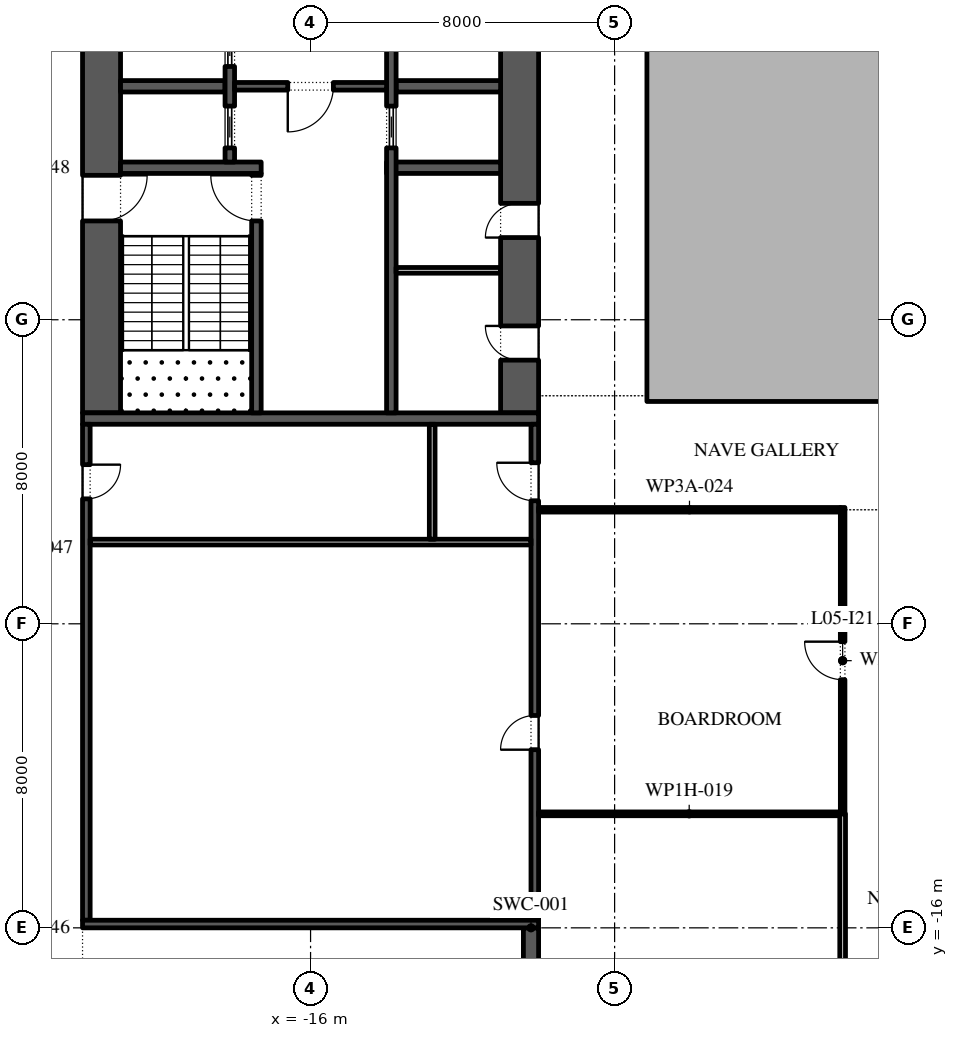
"""IFC4 building model, lengths in metres.
Left out: names, types, materials, properties, quantities, classifications, styles, units other than length and angle.
Written with IfcOpenShell. Run it as: python <this file> out.ifc"""

import sys

from ifc_helpers import new_model, si_unit, direction, frame, frame_2d, origin, place, context, subcontext, project, spatial, polyline, rectangle, outline, extrude, element, fill, save


model = new_model("IFC4")
c1 = context("Model", 3, precision=1e-05, world=origin(), true_north=direction((0.0, 1.0)))
c2 = subcontext(c1, "Body", "Model", "MODEL_VIEW")
j1 = project(units=[si_unit("LENGTHUNIT", "METRE"), si_unit("PLANEANGLEUNIT", "RADIAN")], contexts=[c1])
p1 = place(None, origin())
s1 = spatial("IfcSite", under=j1, at=p1, CompositionType="ELEMENT")
p2 = place(p1, origin())
s2 = spatial("IfcBuilding", under=s1, at=p2, CompositionType="ELEMENT")
p3 = place(p2, frame((0.0, 0.0, 28.8)))
s3 = spatial("IfcBuildingStorey", under=s2, at=p3, CompositionType="ELEMENT", Elevation=28.8)
p4 = place(p3, frame((-10.2, -31.0, 0.0), z_axis=(0.0, 0.0, 1.0), x_axis=(0.0, 1.0, 0.0)))
e1 = element("IfcWall", 1, at=p4, inside=s3, PredefinedType="SHEAR", context=c2, shape_type="SweptSolid", body=[
    extrude(rectangle(XDim=15.0, YDim=0.4, at=frame_2d((7.5, 0.0))), origin(), (0.0, 0.0, 1.0), 4.35),
])
p5 = place(p3, origin())
e2 = element("IfcWall", 2, at=p5, inside=s3, PredefinedType="STANDARD", context=c2, shape_type="SweptSolid", body=[
    extrude(outline(polyline([(-7.15, -2.15), (7.15, -2.15), (7.15, 16.15), (-7.15, 16.15), (-7.15, -2.15)]), holes=[polyline([(-7.0, -2.0), (-7.0, 16.0), (7.0, 16.0), (7.0, -2.0), (-7.0, -2.0)])]), origin(), (0.0, 0.0, 1.0), 4.35),
])
p6 = place(p3, frame((-21.5, -2.45, 0.0), z_axis=(0.0, 0.0, 1.0), x_axis=(0.0, 1.0, 0.0)))
e3 = element("IfcWall", 3, at=p6, inside=s3, PredefinedType="SHEAR", context=c2, shape_type="SweptSolid", body=[
    extrude(rectangle(XDim=27.9, YDim=1.0, at=frame_2d((13.95, 0.0))), origin(), (0.0, 0.0, 1.0), 4.35),
])
p7 = place(p6, frame((5.05, 0.0, 0.0)))
e4 = element("IfcOpeningElement", 4, at=p7, cuts=e3, PredefinedType="OPENING", context=c2, shape_type="SweptSolid", body=[
    extrude(rectangle(XDim=1.2, YDim=2.1, at=frame_2d((0.6, 1.05))), frame((0.0, 0.51, 0.0), z_axis=(0.0, -1.0, 0.0), x_axis=(1.0, 0.0, 0.0)), (0.0, 0.0, 1.0), 1.02),
])
p8 = place(p6, frame((21.65, 0.0, 0.0)))
e5 = element("IfcOpeningElement", 5, at=p8, cuts=e3, PredefinedType="OPENING", context=c2, shape_type="SweptSolid", body=[
    extrude(rectangle(XDim=1.2, YDim=2.1, at=frame_2d((0.6, 1.05))), frame((0.0, 0.51, 0.0), z_axis=(0.0, -1.0, 0.0), x_axis=(1.0, 0.0, 0.0)), (0.0, 0.0, 1.0), 1.02),
])
p9 = place(p3, frame((-10.5, -2.45, 0.0), z_axis=(0.0, 0.0, 1.0), x_axis=(0.0, 1.0, 0.0)))
e6 = element("IfcWall", 6, at=p9, inside=s3, PredefinedType="SHEAR", context=c2, shape_type="SweptSolid", body=[
    extrude(rectangle(XDim=27.9, YDim=1.0, at=frame_2d((13.95, 0.0))), origin(), (0.0, 0.0, 1.0), 4.35),
])
p10 = place(p9, frame((23.65, 0.0, 0.0)))
e7 = element("IfcOpeningElement", 7, at=p10, cuts=e6, PredefinedType="OPENING", context=c2, shape_type="SweptSolid", body=[
    extrude(rectangle(XDim=2.4, YDim=2.1, at=frame_2d((1.2, 1.05))), frame((0.0, 0.51, 0.0), z_axis=(0.0, -1.0, 0.0), x_axis=(1.0, 0.0, 0.0)), (0.0, 0.0, 1.0), 1.02),
])
p11 = place(p9, frame((1.387, 0.0, 0.0)))
e8 = element("IfcOpeningElement", 8, at=p11, cuts=e6, PredefinedType="OPENING", context=c2, shape_type="SweptSolid", body=[
    extrude(rectangle(XDim=0.9, YDim=2.1, at=frame_2d((0.45, 1.05))), frame((0.0, 0.51, 0.0), z_axis=(0.0, -1.0, 0.0), x_axis=(1.0, 0.0, 0.0)), (0.0, 0.0, 1.0), 1.02),
])
p12 = place(p9, frame((4.613, 0.0, 0.0)))
e9 = element("IfcOpeningElement", 9, at=p12, cuts=e6, PredefinedType="OPENING", context=c2, shape_type="SweptSolid", body=[
    extrude(rectangle(XDim=0.9, YDim=2.1, at=frame_2d((0.45, 1.05))), frame((0.0, 0.51, 0.0), z_axis=(0.0, -1.0, 0.0), x_axis=(1.0, 0.0, 0.0)), (0.0, 0.0, 1.0), 1.02),
])
p13 = place(p3, frame((-22.0, -2.6, 0.0), z_axis=(0.0, 0.0, 1.0), x_axis=(1.0, 0.0, 0.0)))
e10 = element("IfcWall", 10, at=p13, inside=s3, PredefinedType="SHEAR", context=c2, shape_type="SweptSolid", body=[
    extrude(rectangle(XDim=12.0, YDim=0.3, at=frame_2d((6.0, 0.0))), origin(), (0.0, 0.0, 1.0), 4.35),
])
p14 = place(p3, frame((-21.0, 4.0, 0.0), z_axis=(0.0, 0.0, 1.0), x_axis=(1.0, 0.0, 0.0)))
e11 = element("IfcWall", 11, at=p14, inside=s3, PredefinedType="SHEAR", context=c2, shape_type="SweptSolid", body=[
    extrude(rectangle(XDim=3.7, YDim=0.3, at=frame_2d((1.85, 0.0))), origin(), (0.0, 0.0, 1.0), 4.35),
])
p15 = place(p3, frame((-17.425, -2.45, 0.0), z_axis=(0.0, 0.0, 1.0), x_axis=(0.0, 1.0, 0.0)))
e12 = element("IfcWall", 12, at=p15, inside=s3, PredefinedType="SHEAR", context=c2, shape_type="SweptSolid", body=[
    extrude(rectangle(XDim=6.3, YDim=0.25, at=frame_2d((3.15, 0.0))), origin(), (0.0, 0.0, 1.0), 4.35),
])
p16 = place(p15, frame((5.05, 0.0, 0.0)))
e13 = element("IfcOpeningElement", 13, at=p16, cuts=e12, PredefinedType="OPENING", context=c2, shape_type="SweptSolid", body=[
    extrude(rectangle(XDim=1.2, YDim=2.1, at=frame_2d((0.6, 1.05))), frame((0.0, 0.135, 0.0), z_axis=(0.0, -1.0, 0.0), x_axis=(1.0, 0.0, 0.0)), (0.0, 0.0, 1.0), 0.27),
])
p17 = place(p3, frame((-21.0, 6.143, 0.0), z_axis=(0.0, 0.0, 1.0), x_axis=(1.0, 0.0, 0.0)))
e14 = element("IfcWall", 14, at=p17, inside=s3, PredefinedType="SHEAR", context=c2, shape_type="SweptSolid", body=[
    extrude(rectangle(XDim=2.75, YDim=0.3, at=frame_2d((1.375, 0.0))), origin(), (0.0, 0.0, 1.0), 4.35),
])
p18 = place(p3, frame((-18.125, 4.15, 0.0), z_axis=(0.0, 0.0, 1.0), x_axis=(0.0, 1.0, 0.0)))
e15 = element("IfcWall", 15, at=p18, inside=s3, PredefinedType="SHEAR", context=c2, shape_type="SweptSolid", body=[
    extrude(rectangle(XDim=14.7, YDim=0.25, at=frame_2d((7.35, 0.0))), origin(), (0.0, 0.0, 1.0), 4.35),
])
p19 = place(p18, frame((0.371, 0.0, 0.0)))
e16 = element("IfcOpeningElement", 16, at=p19, cuts=e15, PredefinedType="OPENING", context=c2, shape_type="SweptSolid", body=[
    extrude(rectangle(XDim=1.1, YDim=2.1, at=frame_2d((0.55, 1.05))), frame((0.0, 0.135, 0.0), z_axis=(0.0, -1.0, 0.0), x_axis=(1.0, 0.0, 0.0)), (0.0, 0.0, 1.0), 0.27),
])
p20 = place(p18, frame((2.514, 0.0, 0.0)))
e17 = element("IfcOpeningElement", 17, at=p20, cuts=e15, PredefinedType="OPENING", context=c2, shape_type="SweptSolid", body=[
    extrude(rectangle(XDim=1.1, YDim=2.1, at=frame_2d((0.55, 1.05))), frame((0.0, 0.135, 0.0), z_axis=(0.0, -1.0, 0.0), x_axis=(1.0, 0.0, 0.0)), (0.0, 0.0, 1.0), 0.27),
])
p21 = place(p18, frame((4.657, 0.0, 0.0)))
e18 = element("IfcOpeningElement", 18, at=p21, cuts=e15, PredefinedType="OPENING", context=c2, shape_type="SweptSolid", body=[
    extrude(rectangle(XDim=1.1, YDim=2.1, at=frame_2d((0.55, 1.05))), frame((0.0, 0.135, 0.0), z_axis=(0.0, -1.0, 0.0), x_axis=(1.0, 0.0, 0.0)), (0.0, 0.0, 1.0), 0.27),
])
p22 = place(p18, frame((6.8, 0.0, 0.0)))
e19 = element("IfcOpeningElement", 19, at=p22, cuts=e15, PredefinedType="OPENING", context=c2, shape_type="SweptSolid", body=[
    extrude(rectangle(XDim=1.1, YDim=2.1, at=frame_2d((0.55, 1.05))), frame((0.0, 0.135, 0.0), z_axis=(0.0, -1.0, 0.0), x_axis=(1.0, 0.0, 0.0)), (0.0, 0.0, 1.0), 0.27),
])
p23 = place(p18, frame((8.943, 0.0, 0.0)))
e20 = element("IfcOpeningElement", 20, at=p23, cuts=e15, PredefinedType="OPENING", context=c2, shape_type="SweptSolid", body=[
    extrude(rectangle(XDim=1.1, YDim=2.1, at=frame_2d((0.55, 1.05))), frame((0.0, 0.135, 0.0), z_axis=(0.0, -1.0, 0.0), x_axis=(1.0, 0.0, 0.0)), (0.0, 0.0, 1.0), 0.27),
])
p24 = place(p18, frame((11.086, 0.0, 0.0)))
e21 = element("IfcOpeningElement", 21, at=p24, cuts=e15, PredefinedType="OPENING", context=c2, shape_type="SweptSolid", body=[
    extrude(rectangle(XDim=1.1, YDim=2.1, at=frame_2d((0.55, 1.05))), frame((0.0, 0.135, 0.0), z_axis=(0.0, -1.0, 0.0), x_axis=(1.0, 0.0, 0.0)), (0.0, 0.0, 1.0), 0.27),
])
p25 = place(p18, frame((13.229, 0.0, 0.0)))
e22 = element("IfcOpeningElement", 22, at=p25, cuts=e15, PredefinedType="OPENING", context=c2, shape_type="SweptSolid", body=[
    extrude(rectangle(XDim=1.1, YDim=2.1, at=frame_2d((0.55, 1.05))), frame((0.0, 0.135, 0.0), z_axis=(0.0, -1.0, 0.0), x_axis=(1.0, 0.0, 0.0)), (0.0, 0.0, 1.0), 0.27),
])
p26 = place(p3, frame((-14.0, 4.0, 0.0), z_axis=(0.0, 0.0, 1.0), x_axis=(1.0, 0.0, 0.0)))
e23 = element("IfcWall", 23, at=p26, inside=s3, PredefinedType="SHEAR", context=c2, shape_type="SweptSolid", body=[
    extrude(rectangle(XDim=3.0, YDim=0.3, at=frame_2d((1.5, 0.0))), origin(), (0.0, 0.0, 1.0), 4.35),
])
p27 = place(p3, frame((-13.75, 6.143, 0.0), z_axis=(0.0, 0.0, 1.0), x_axis=(1.0, 0.0, 0.0)))
e24 = element("IfcWall", 24, at=p27, inside=s3, PredefinedType="SHEAR", context=c2, shape_type="SweptSolid", body=[
    extrude(rectangle(XDim=2.75, YDim=0.3, at=frame_2d((1.375, 0.0))), origin(), (0.0, 0.0, 1.0), 4.35),
])
p28 = place(p3, frame((-13.875, -2.45, 0.0), z_axis=(0.0, 0.0, 1.0), x_axis=(0.0, 1.0, 0.0)))
e25 = element("IfcWall", 25, at=p28, inside=s3, PredefinedType="SHEAR", context=c2, shape_type="SweptSolid", body=[
    extrude(rectangle(XDim=21.3, YDim=0.25, at=frame_2d((10.65, 0.0))), origin(), (0.0, 0.0, 1.0), 4.35),
])
p29 = place(p28, frame((11.446, 0.0, 0.0)))
e26 = element("IfcOpeningElement", 26, at=p29, cuts=e25, PredefinedType="OPENING", context=c2, shape_type="SweptSolid", body=[
    extrude(rectangle(XDim=0.9, YDim=2.1, at=frame_2d((0.45, 1.05))), frame((0.0, 0.135, 0.0), z_axis=(0.0, -1.0, 0.0), x_axis=(1.0, 0.0, 0.0)), (0.0, 0.0, 1.0), 0.27),
])
p30 = place(p28, frame((17.725, 0.0, 0.0)))
e27 = element("IfcOpeningElement", 27, at=p30, cuts=e25, PredefinedType="OPENING", context=c2, shape_type="SweptSolid", body=[
    extrude(rectangle(XDim=0.9, YDim=2.1, at=frame_2d((0.45, 1.05))), frame((0.0, 0.135, 0.0), z_axis=(0.0, -1.0, 0.0), x_axis=(1.0, 0.0, 0.0)), (0.0, 0.0, 1.0), 0.27),
])
p31 = place(p28, frame((6.971, 0.0, 0.0)))
e28 = element("IfcOpeningElement", 28, at=p31, cuts=e25, PredefinedType="OPENING", context=c2, shape_type="SweptSolid", body=[
    extrude(rectangle(XDim=1.1, YDim=2.1, at=frame_2d((0.55, 1.05))), frame((0.0, 0.135, 0.0), z_axis=(0.0, -1.0, 0.0), x_axis=(1.0, 0.0, 0.0)), (0.0, 0.0, 1.0), 0.27),
])
p32 = place(p3, frame((-18.0, 6.143, 0.0), z_axis=(0.0, 0.0, 1.0), x_axis=(1.0, 0.0, 0.0)))
e29 = element("IfcWall", 29, at=p32, inside=s3, PredefinedType="SHEAR", context=c2, shape_type="SweptSolid", body=[
    extrude(rectangle(XDim=4.0, YDim=0.2, at=frame_2d((2.0, 0.0))), origin(), (0.0, 0.0, 1.0), 4.35),
])
p33 = place(p32, frame((1.4, 0.0, 0.0)))
e30 = element("IfcOpeningElement", 30, at=p33, cuts=e29, PredefinedType="OPENING", context=c2, shape_type="SweptSolid", body=[
    extrude(rectangle(XDim=1.2, YDim=2.1, at=frame_2d((0.6, 1.05))), frame((0.0, 0.11, 0.0), z_axis=(0.0, -1.0, 0.0), x_axis=(1.0, 0.0, 0.0)), (0.0, 0.0, 1.0), 0.22),
])
p34 = place(p3, frame((-13.75, 1.3, 0.0), z_axis=(0.0, 0.0, 1.0), x_axis=(1.0, 0.0, 0.0)))
e31 = element("IfcWall", 31, at=p34, inside=s3, PredefinedType="PARTITIONING", context=c2, shape_type="SweptSolid", body=[
    extrude(rectangle(XDim=2.75, YDim=0.15, at=frame_2d((1.375, 0.0))), origin(), (0.0, 0.0, 1.0), 4.35),
])
p35 = place(p3, frame((-21.9, -15.8, 0.0), z_axis=(0.0, 0.0, 1.0), x_axis=(0.0, 1.0, 0.0)))
e32 = element("IfcWall", 32, at=p35, inside=s3, PredefinedType="SHEAR", context=c2, shape_type="SweptSolid", body=[
    extrude(rectangle(XDim=13.05, YDim=0.2, at=frame_2d((6.525, 0.0))), origin(), (0.0, 0.0, 1.0), 4.35),
])
p36 = place(p35, frame((11.087, 0.0, 0.0)))
e33 = element("IfcOpeningElement", 33, at=p36, cuts=e32, PredefinedType="OPENING", context=c2, shape_type="SweptSolid", body=[
    extrude(rectangle(XDim=0.9, YDim=2.1, at=frame_2d((0.45, 1.05))), frame((0.0, 0.11, 0.0), z_axis=(0.0, -1.0, 0.0), x_axis=(1.0, 0.0, 0.0)), (0.0, 0.0, 1.0), 0.22),
])
p37 = place(p3, frame((-10.1, -15.8, 0.0), z_axis=(0.0, 0.0, 1.0), x_axis=(0.0, 1.0, 0.0)))
e34 = element("IfcWall", 34, at=p37, inside=s3, PredefinedType="SHEAR", context=c2, shape_type="SweptSolid", body=[
    extrude(rectangle(XDim=13.05, YDim=0.2, at=frame_2d((6.525, 0.0))), origin(), (0.0, 0.0, 1.0), 4.35),
])
p38 = place(p37, frame((4.488, 0.0, 0.0)))
e35 = element("IfcOpeningElement", 35, at=p38, cuts=e34, PredefinedType="OPENING", context=c2, shape_type="SweptSolid", body=[
    extrude(rectangle(XDim=0.9, YDim=2.1, at=frame_2d((0.45, 1.05))), frame((0.0, 0.11, 0.0), z_axis=(0.0, -1.0, 0.0), x_axis=(1.0, 0.0, 0.0)), (0.0, 0.0, 1.0), 0.22),
])
p39 = place(p37, frame((11.038, 0.0, 0.0)))
e36 = element("IfcOpeningElement", 36, at=p39, cuts=e34, PredefinedType="OPENING", context=c2, shape_type="SweptSolid", body=[
    extrude(rectangle(XDim=1.0, YDim=2.1, at=frame_2d((0.5, 1.05))), frame((0.0, 0.11, 0.0), z_axis=(0.0, -1.0, 0.0), x_axis=(1.0, 0.0, 0.0)), (0.0, 0.0, 1.0), 0.22),
])
p40 = place(p3, frame((-22.0, -15.9, 0.0), z_axis=(0.0, 0.0, 1.0), x_axis=(1.0, 0.0, 0.0)))
e37 = element("IfcWall", 37, at=p40, inside=s3, PredefinedType="SHEAR", context=c2, shape_type="SweptSolid", body=[
    extrude(rectangle(XDim=12.0, YDim=0.2, at=frame_2d((6.0, 0.0))), origin(), (0.0, 0.0, 1.0), 4.35),
])
p41 = place(p3, frame((-21.8, -5.85, 0.0), z_axis=(0.0, 0.0, 1.0), x_axis=(1.0, 0.0, 0.0)))
e38 = element("IfcWall", 38, at=p41, inside=s3, PredefinedType="PARTITIONING", context=c2, shape_type="SweptSolid", body=[
    extrude(rectangle(XDim=11.6, YDim=0.15, at=frame_2d((5.8, 0.0))), origin(), (0.0, 0.0, 1.0), 4.35),
])
p42 = place(p3, frame((-12.8, -5.775, 0.0), z_axis=(0.0, 0.0, 1.0), x_axis=(0.0, 1.0, 0.0)))
e39 = element("IfcWall", 39, at=p42, inside=s3, PredefinedType="PARTITIONING", context=c2, shape_type="SweptSolid", body=[
    extrude(rectangle(XDim=3.025, YDim=0.15, at=frame_2d((1.512, 0.0))), origin(), (0.0, 0.0, 1.0), 4.35),
])
p43 = place(p3, frame((-10.0, -13.0, 0.0), z_axis=(0.0, 0.0, 1.0), x_axis=(1.0, 0.0, 0.0)))
e40 = element("IfcWall", 40, at=p43, inside=s3, PredefinedType="PARTITIONING", context=c2, shape_type="SweptSolid", body=[
    extrude(rectangle(XDim=7.925, YDim=0.1, at=frame_2d((3.962, 0.0))), origin(), (0.0, 0.0, 1.0), 4.35),
])
p44 = place(p3, frame((-10.0, -5.0, 0.0), z_axis=(0.0, 0.0, 1.0), x_axis=(1.0, 0.0, 0.0)))
e41 = element("IfcWall", 41, at=p44, inside=s3, PredefinedType="PARTITIONING", context=c2, shape_type="SweptSolid", body=[
    extrude(rectangle(XDim=7.94, YDim=0.12, at=frame_2d((3.97, 0.0))), origin(), (0.0, 0.0, 1.0), 4.35),
])
p45 = place(p3, frame((-2.0, -28.575, 0.0), z_axis=(0.0, 0.0, 1.0), x_axis=(0.0, 1.0, 0.0)))
e42 = element("IfcWall", 42, at=p45, inside=s3, PredefinedType="PARTITIONING", context=c2, shape_type="SweptSolid", body=[
    extrude(rectangle(XDim=15.575, YDim=0.15, at=frame_2d((7.788, 0.0))), origin(), (0.0, 0.0, 1.0), 4.35),
])
p46 = place(p45, frame((7.288, 0.0, 0.0)))
e43 = element("IfcOpeningElement", 43, at=p46, cuts=e42, PredefinedType="OPENING", context=c2, shape_type="SweptSolid", body=[
    extrude(rectangle(XDim=1.0, YDim=2.1, at=frame_2d((0.5, 1.05))), frame((0.0, 0.085, 0.0), z_axis=(0.0, -1.0, 0.0), x_axis=(1.0, 0.0, 0.0)), (0.0, 0.0, 1.0), 0.17),
])
p47 = place(p3, frame((-2.0, -13.0, 0.0), z_axis=(0.0, 0.0, 1.0), x_axis=(0.0, 1.0, 0.0)))
e44 = element("IfcWall", 44, at=p47, inside=s3, PredefinedType="PARTITIONING", context=c2, shape_type="SweptSolid", body=[
    extrude(rectangle(XDim=8.06, YDim=0.12, at=frame_2d((4.03, 0.0))), origin(), (0.0, 0.0, 1.0), 4.35),
])
p48 = place(p47, frame((3.53, 0.0, 0.0)))
e45 = element("IfcOpeningElement", 45, at=p48, cuts=e44, PredefinedType="OPENING", context=c2, shape_type="SweptSolid", body=[
    extrude(rectangle(XDim=1.0, YDim=2.1, at=frame_2d((0.5, 1.05))), frame((0.0, 0.07, 0.0), z_axis=(0.0, -1.0, 0.0), x_axis=(1.0, 0.0, 0.0)), (0.0, 0.0, 1.0), 0.14),
])
p49 = place(p19, origin())
e46 = element("IfcDoor", 46, at=p49, inside=s3, OperationType="SLIDING_TO_LEFT", PredefinedType="DOOR", context=c2, shape_type="SweptSolid", body=[
    extrude(rectangle(XDim=1.1, YDim=2.1, at=frame_2d((0.55, 1.05))), frame((0.0, 0.025, 0.0), z_axis=(0.0, -1.0, 0.0), x_axis=(1.0, 0.0, 0.0)), (0.0, 0.0, 1.0), 0.05),
])
fill(e16, e46)
p50 = place(p20, origin())
e47 = element("IfcDoor", 47, at=p50, inside=s3, OperationType="SLIDING_TO_LEFT", PredefinedType="DOOR", context=c2, shape_type="SweptSolid", body=[
    extrude(rectangle(XDim=1.1, YDim=2.1, at=frame_2d((0.55, 1.05))), frame((0.0, 0.025, 0.0), z_axis=(0.0, -1.0, 0.0), x_axis=(1.0, 0.0, 0.0)), (0.0, 0.0, 1.0), 0.05),
])
fill(e17, e47)
p51 = place(p31, origin())
e48 = element("IfcDoor", 48, at=p51, inside=s3, OperationType="SLIDING_TO_LEFT", PredefinedType="DOOR", context=c2, shape_type="SweptSolid", body=[
    extrude(rectangle(XDim=1.1, YDim=2.1, at=frame_2d((0.55, 1.05))), frame((0.0, 0.025, 0.0), z_axis=(0.0, -1.0, 0.0), x_axis=(1.0, 0.0, 0.0)), (0.0, 0.0, 1.0), 0.05),
])
fill(e28, e48)
p52 = place(p33, frame((1.2, 0.0, 0.0), z_axis=(0.0, 0.0, 1.0), x_axis=(-1.0, 0.0, 0.0)))
e49 = element("IfcDoor", 49, at=p52, inside=s3, OperationType="SINGLE_SWING_LEFT", PredefinedType="DOOR", context=c2, shape_type="SweptSolid", body=[
    extrude(rectangle(XDim=1.2, YDim=2.1, at=frame_2d((0.6, 1.05))), frame((0.0, 0.025, 0.0), z_axis=(0.0, -1.0, 0.0), x_axis=(1.0, 0.0, 0.0)), (0.0, 0.0, 1.0), 0.05),
])
fill(e30, e49)
p53 = place(p16, origin())
e50 = element("IfcDoor", 50, at=p53, inside=s3, OperationType="SINGLE_SWING_LEFT", PredefinedType="DOOR", context=c2, shape_type="SweptSolid", body=[
    extrude(rectangle(XDim=1.2, YDim=2.1, at=frame_2d((0.6, 1.05))), frame((0.0, 0.025, 0.0), z_axis=(0.0, -1.0, 0.0), x_axis=(1.0, 0.0, 0.0)), (0.0, 0.0, 1.0), 0.05),
])
fill(e13, e50)
p54 = place(p7, frame((1.2, 0.0, 0.0), z_axis=(0.0, 0.0, 1.0), x_axis=(-1.0, 0.0, 0.0)))
e51 = element("IfcDoor", 51, at=p54, inside=s3, OperationType="SINGLE_SWING_RIGHT", PredefinedType="DOOR", context=c2, shape_type="SweptSolid", body=[
    extrude(rectangle(XDim=1.2, YDim=2.1, at=frame_2d((0.6, 1.05))), frame((0.0, 0.025, 0.0), z_axis=(0.0, -1.0, 0.0), x_axis=(1.0, 0.0, 0.0)), (0.0, 0.0, 1.0), 0.05),
])
fill(e4, e51)
p55 = place(p11, origin())
e52 = element("IfcDoor", 52, at=p55, inside=s3, OperationType="SINGLE_SWING_LEFT", PredefinedType="DOOR", context=c2, shape_type="SweptSolid", body=[
    extrude(rectangle(XDim=0.9, YDim=2.1, at=frame_2d((0.45, 1.05))), frame((0.0, 0.5, 0.0), z_axis=(0.0, -1.0, 0.0), x_axis=(1.0, 0.0, 0.0)), (0.0, 0.0, 1.0), 0.05),
])
fill(e8, e52)
p56 = place(p12, origin())
e53 = element("IfcDoor", 53, at=p56, inside=s3, OperationType="SINGLE_SWING_RIGHT", PredefinedType="DOOR", context=c2, shape_type="SweptSolid", body=[
    extrude(rectangle(XDim=0.9, YDim=2.1, at=frame_2d((0.45, 1.05))), frame((0.0, 0.5, 0.0), z_axis=(0.0, -1.0, 0.0), x_axis=(1.0, 0.0, 0.0)), (0.0, 0.0, 1.0), 0.05),
])
fill(e9, e53)
p57 = place(p38, origin())
e54 = element("IfcDoor", 54, at=p57, inside=s3, OperationType="SINGLE_SWING_RIGHT", PredefinedType="DOOR", context=c2, shape_type="SweptSolid", body=[
    extrude(rectangle(XDim=0.9, YDim=2.1, at=frame_2d((0.45, 1.05))), frame((0.0, 0.1, 0.0), z_axis=(0.0, -1.0, 0.0), x_axis=(1.0, 0.0, 0.0)), (0.0, 0.0, 1.0), 0.05),
])
fill(e35, e54)
p58 = place(p39, origin())
e55 = element("IfcDoor", 55, at=p58, inside=s3, OperationType="SINGLE_SWING_LEFT", PredefinedType="DOOR", context=c2, shape_type="SweptSolid", body=[
    extrude(rectangle(XDim=1.0, YDim=2.1, at=frame_2d((0.5, 1.05))), frame((0.0, 0.1, 0.0), z_axis=(0.0, -1.0, 0.0), x_axis=(1.0, 0.0, 0.0)), (0.0, 0.0, 1.0), 0.05),
])
fill(e36, e55)
p59 = place(p36, frame((0.9, -0.15, 0.0), z_axis=(0.0, 0.0, 1.0), x_axis=(-1.0, 0.0, 0.0)))
e56 = element("IfcDoor", 56, at=p59, inside=s3, OperationType="SINGLE_SWING_RIGHT", PredefinedType="DOOR", context=c2, shape_type="SweptSolid", body=[
    extrude(rectangle(XDim=0.9, YDim=2.1, at=frame_2d((0.45, 1.05))), frame((0.0, -0.05, 0.0), z_axis=(0.0, -1.0, 0.0), x_axis=(1.0, 0.0, 0.0)), (0.0, 0.0, 1.0), 0.05),
])
fill(e33, e56)
p60 = place(p48, origin())
e57 = element("IfcDoor", 57, at=p60, inside=s3, OperationType="SINGLE_SWING_LEFT", PredefinedType="DOOR", context=c2, shape_type="SweptSolid", body=[
    extrude(rectangle(XDim=1.0, YDim=2.1, at=frame_2d((0.5, 1.05))), frame((0.0, 0.025, 0.0), z_axis=(0.0, -1.0, 0.0), x_axis=(1.0, 0.0, 0.0)), (0.0, 0.0, 1.0), 0.05),
])
fill(e45, e57)
save(model, sys.argv[1])
